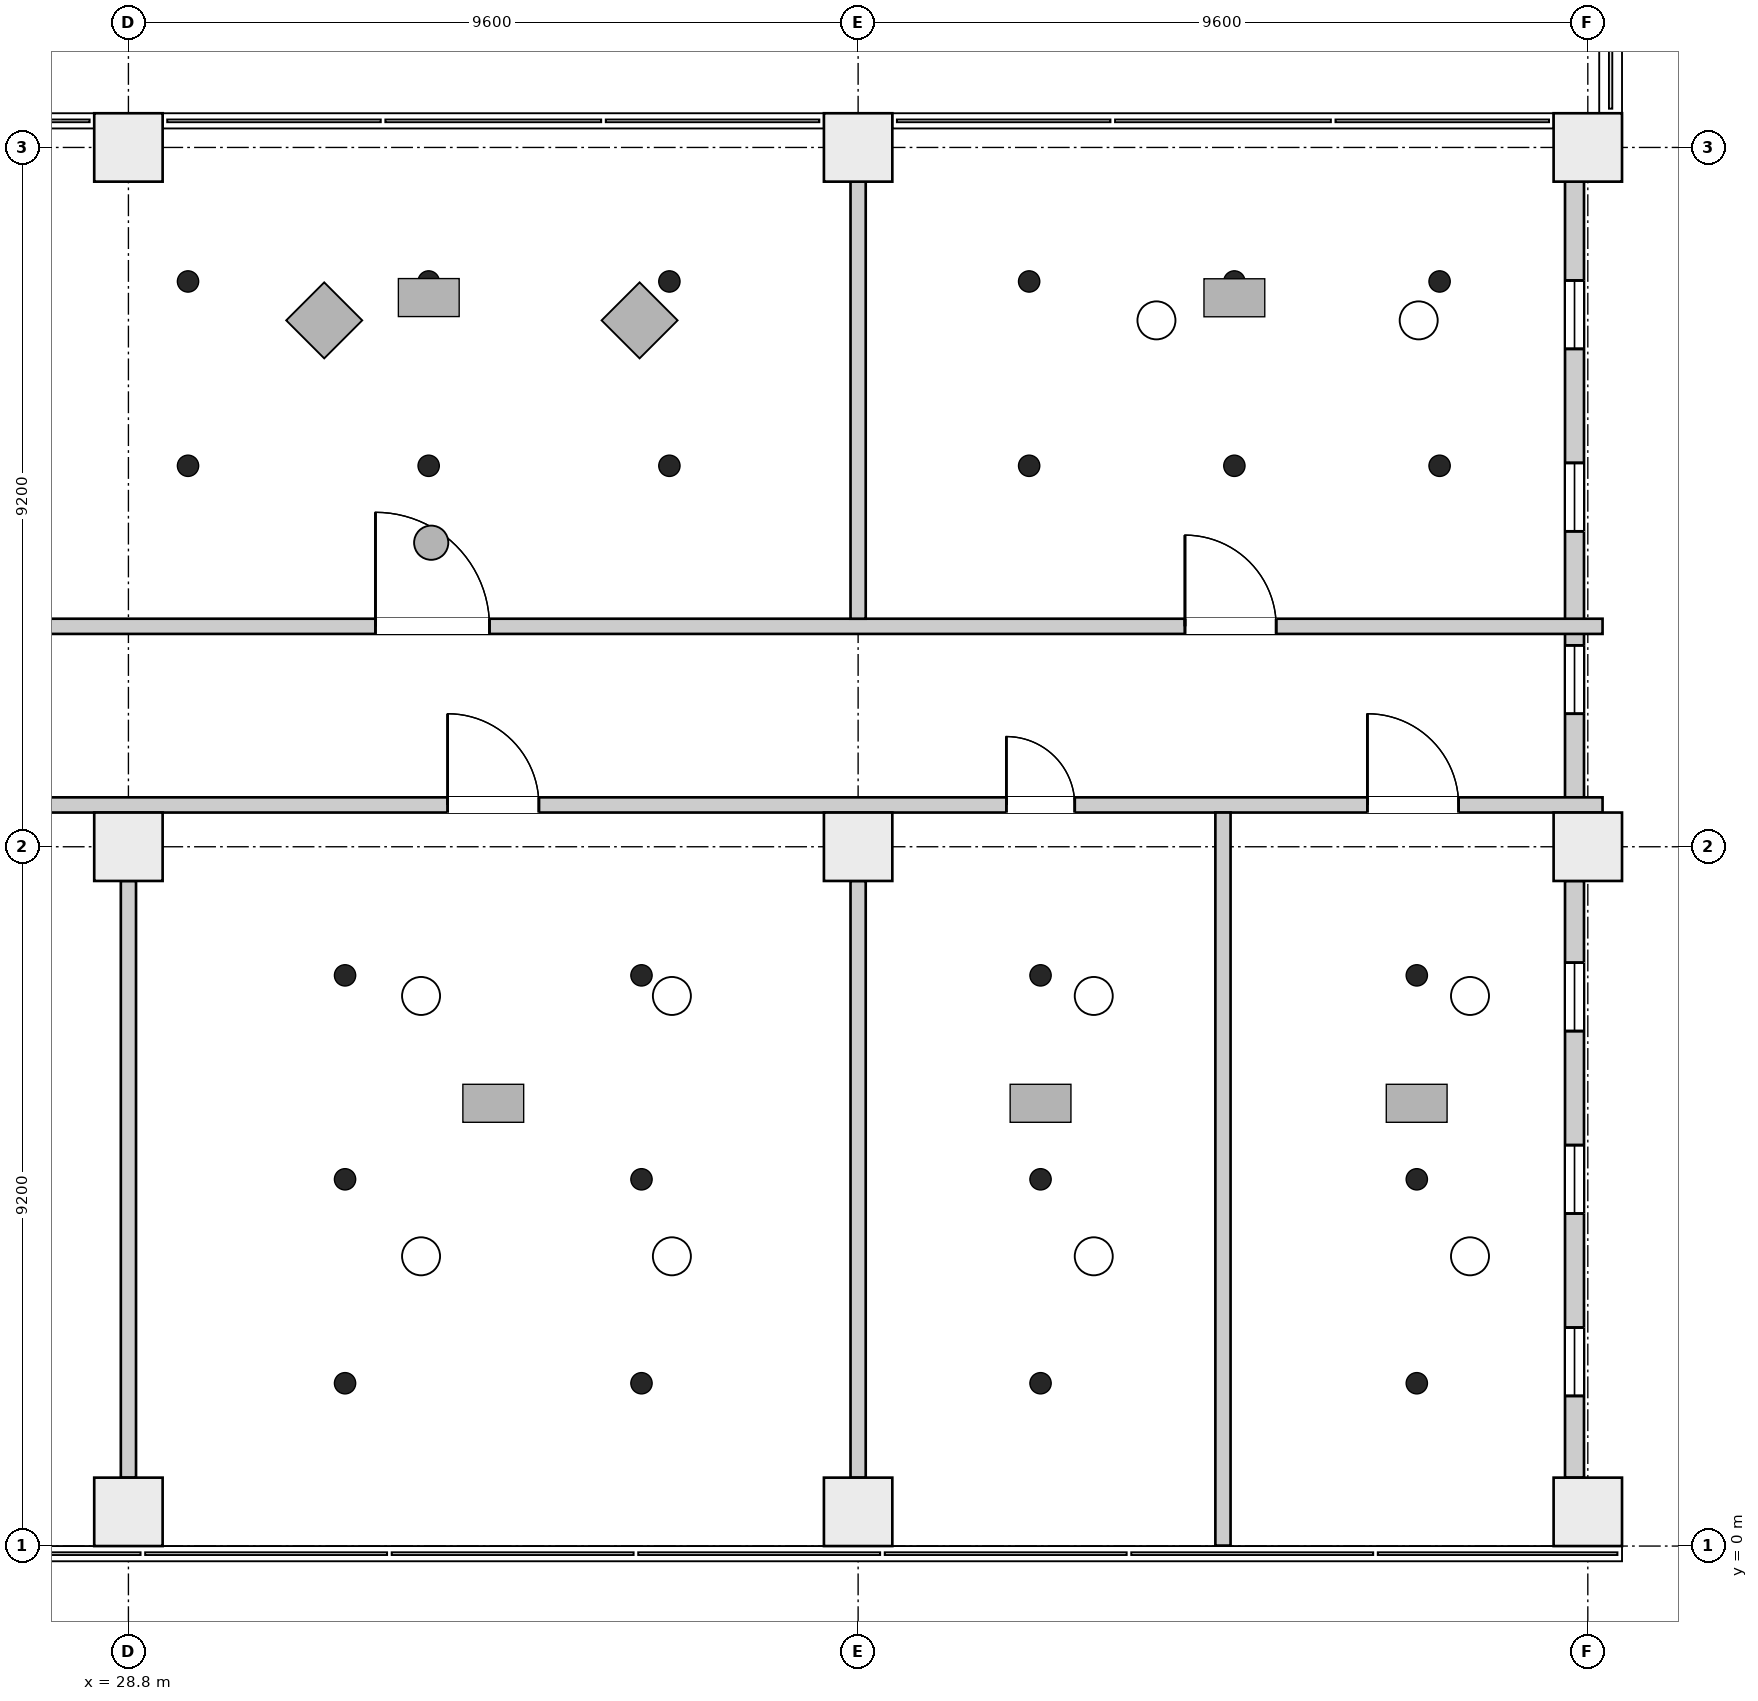
"""IFC4 building model, lengths in metres.
Left out: names, types, materials, properties, quantities, classifications, styles, units other than length and angle.
Written with IfcOpenShell. Run it as: python <this file> out.ifc"""

import sys

from ifc_helpers import new_model, si_unit, direction, frame, frame_2d, origin, origin_2d, place, context, subcontext, project, spatial, rectangle, extrude, element, fill, save


model = new_model("IFC4")
c1 = context("Model", 3, precision=1e-05, world=origin(), true_north=direction((0.0, 1.0)))
c2 = subcontext(c1, "Body", "Model", "MODEL_VIEW")
j1 = project(units=[si_unit("LENGTHUNIT", "METRE"), si_unit("PLANEANGLEUNIT", "RADIAN")], contexts=[c1])
p1 = place(None, origin())
s1 = spatial("IfcSite", under=j1, at=p1, CompositionType="ELEMENT")
p2 = place(p1, origin())
s2 = spatial("IfcBuilding", under=s1, at=p2, CompositionType="ELEMENT")
p3 = place(p2, frame((0.0, 0.0, 61.3)))
s3 = spatial("IfcBuildingStorey", under=s2, at=p3, CompositionType="ELEMENT", Elevation=61.3)
for number, where, z_axis, x_axis in (
    (1, (28.8, 0.45, 0.0), (0.0, 0.0, 1.0), (1.0, 0.0, 0.0)),
    (2, (38.4, 0.45, 0.0), (0.0, 0.0, 1.0), (1.0, 0.0, 0.0)),
    (3, (48.0, 0.45, 0.0), (0.0, 0.0, 1.0), (1.0, 0.0, 0.0)),
    (4, (28.8, 9.2, 0.0), (0.0, 0.0, 1.0), (1.0, 0.0, 0.0)),
    (5, (38.4, 9.2, 0.0), (0.0, 0.0, 1.0), (1.0, 0.0, 0.0)),
    (6, (48.0, 9.2, 0.0), (0.0, 0.0, 1.0), (1.0, 0.0, 0.0)),
    (7, (28.8, 18.4, 0.0), (0.0, 0.0, 1.0), (1.0, 0.0, 0.0)),
    (8, (38.4, 18.4, 0.0), (0.0, 0.0, 1.0), (1.0, 0.0, 0.0)),
    (9, (48.0, 18.4, 0.0), (0.0, 0.0, 1.0), (1.0, 0.0, 0.0)),
):
    element("IfcColumn", number, at=place(p3, frame(where, z_axis=z_axis, x_axis=x_axis)), inside=s3, PredefinedType="COLUMN", context=c2, shape_type="SweptSolid", body=[
        extrude(rectangle(XDim=0.9, YDim=0.9, at=origin_2d()), origin(), (0.0, 0.0, 1.0), 4.2),
    ])
p4 = place(p3, frame((47.825, 0.9, 0.0), z_axis=(0.0, 0.0, 1.0), x_axis=(0.0, 1.0, 0.0)))
e10 = element("IfcWall", 10, at=p4, inside=s3, PredefinedType="ELEMENTEDWALL", context=c2, shape_type="SweptSolid", body=[
    extrude(rectangle(XDim=7.85, YDim=0.25, at=frame_2d((3.925, 0.0))), origin(), (0.0, 0.0, 1.0), 3.3),
])
p5 = place(p4, frame((1.075, 0.0, 0.6)))
e11 = element("IfcOpeningElement", 11, at=p5, cuts=e10, PredefinedType="OPENING", context=c2, shape_type="SweptSolid", body=[
    extrude(rectangle(XDim=0.9, YDim=2.6, at=frame_2d((0.45, 1.3))), frame((0.0, 0.135, 0.0), z_axis=(0.0, -1.0, 0.0), x_axis=(1.0, 0.0, 0.0)), (0.0, 0.0, 1.0), 0.27),
])
p6 = place(p4, frame((3.475, 0.0, 0.6)))
e12 = element("IfcOpeningElement", 12, at=p6, cuts=e10, PredefinedType="OPENING", context=c2, shape_type="SweptSolid", body=[
    extrude(rectangle(XDim=0.9, YDim=2.6, at=frame_2d((0.45, 1.3))), frame((0.0, 0.135, 0.0), z_axis=(0.0, -1.0, 0.0), x_axis=(1.0, 0.0, 0.0)), (0.0, 0.0, 1.0), 0.27),
])
p7 = place(p4, frame((5.875, 0.0, 0.6)))
e13 = element("IfcOpeningElement", 13, at=p7, cuts=e10, PredefinedType="OPENING", context=c2, shape_type="SweptSolid", body=[
    extrude(rectangle(XDim=0.9, YDim=2.6, at=frame_2d((0.45, 1.3))), frame((0.0, 0.135, 0.0), z_axis=(0.0, -1.0, 0.0), x_axis=(1.0, 0.0, 0.0)), (0.0, 0.0, 1.0), 0.27),
])
p8 = place(p3, frame((47.825, 9.65, 0.0), z_axis=(0.0, 0.0, 1.0), x_axis=(0.0, 1.0, 0.0)))
e14 = element("IfcWall", 14, at=p8, inside=s3, PredefinedType="ELEMENTEDWALL", context=c2, shape_type="SweptSolid", body=[
    extrude(rectangle(XDim=8.3, YDim=0.25, at=frame_2d((4.15, 0.0))), origin(), (0.0, 0.0, 1.0), 3.3),
])
p9 = place(p8, frame((1.3, 0.0, 0.6)))
e15 = element("IfcOpeningElement", 15, at=p9, cuts=e14, PredefinedType="OPENING", context=c2, shape_type="SweptSolid", body=[
    extrude(rectangle(XDim=0.9, YDim=2.6, at=frame_2d((0.45, 1.3))), frame((0.0, 0.135, 0.0), z_axis=(0.0, -1.0, 0.0), x_axis=(1.0, 0.0, 0.0)), (0.0, 0.0, 1.0), 0.27),
])
p10 = place(p8, frame((3.7, 0.0, 0.6)))
e16 = element("IfcOpeningElement", 16, at=p10, cuts=e14, PredefinedType="OPENING", context=c2, shape_type="SweptSolid", body=[
    extrude(rectangle(XDim=0.9, YDim=2.6, at=frame_2d((0.45, 1.3))), frame((0.0, 0.135, 0.0), z_axis=(0.0, -1.0, 0.0), x_axis=(1.0, 0.0, 0.0)), (0.0, 0.0, 1.0), 0.27),
])
p11 = place(p8, frame((6.1, 0.0, 0.6)))
e17 = element("IfcOpeningElement", 17, at=p11, cuts=e14, PredefinedType="OPENING", context=c2, shape_type="SweptSolid", body=[
    extrude(rectangle(XDim=0.9, YDim=2.6, at=frame_2d((0.45, 1.3))), frame((0.0, 0.135, 0.0), z_axis=(0.0, -1.0, 0.0), x_axis=(1.0, 0.0, 0.0)), (0.0, 0.0, 1.0), 0.27),
])
p12 = place(p3, frame((4.3, 9.75, 0.0), z_axis=(0.0, 0.0, 1.0), x_axis=(1.0, 0.0, 0.0)))
e18 = element("IfcWall", 18, at=p12, inside=s3, PredefinedType="PARTITIONING", context=c2, shape_type="SweptSolid", body=[
    extrude(rectangle(XDim=43.894, YDim=0.2, at=frame_2d((21.947, 0.0))), origin(), (0.0, 0.0, 1.0), 3.9),
])
p13 = place(p12, frame((18.8, 0.0, 0.0)))
e19 = element("IfcOpeningElement", 19, at=p13, cuts=e18, PredefinedType="OPENING", context=c2, shape_type="SweptSolid", body=[
    extrude(rectangle(XDim=1.8, YDim=2.1, at=frame_2d((0.9, 1.05))), frame((0.0, 0.11, 0.0), z_axis=(0.0, -1.0, 0.0), x_axis=(1.0, 0.0, 0.0)), (0.0, 0.0, 1.0), 0.22),
])
p14 = place(p12, frame((28.7, 0.0, 0.0)))
e20 = element("IfcOpeningElement", 20, at=p14, cuts=e18, PredefinedType="OPENING", context=c2, shape_type="SweptSolid", body=[
    extrude(rectangle(XDim=1.2, YDim=2.1, at=frame_2d((0.6, 1.05))), frame((0.0, 0.11, 0.0), z_axis=(0.0, -1.0, 0.0), x_axis=(1.0, 0.0, 0.0)), (0.0, 0.0, 1.0), 0.22),
])
p15 = place(p12, frame((36.05, 0.0, 0.0)))
e21 = element("IfcOpeningElement", 21, at=p15, cuts=e18, PredefinedType="OPENING", context=c2, shape_type="SweptSolid", body=[
    extrude(rectangle(XDim=0.9, YDim=2.1, at=frame_2d((0.45, 1.05))), frame((0.0, 0.11, 0.0), z_axis=(0.0, -1.0, 0.0), x_axis=(1.0, 0.0, 0.0)), (0.0, 0.0, 1.0), 0.22),
])
p16 = place(p12, frame((40.8, 0.0, 0.0)))
e22 = element("IfcOpeningElement", 22, at=p16, cuts=e18, PredefinedType="OPENING", context=c2, shape_type="SweptSolid", body=[
    extrude(rectangle(XDim=1.2, YDim=2.1, at=frame_2d((0.6, 1.05))), frame((0.0, 0.11, 0.0), z_axis=(0.0, -1.0, 0.0), x_axis=(1.0, 0.0, 0.0)), (0.0, 0.0, 1.0), 0.22),
])
p17 = place(p3, frame((27.206, 12.1, 0.0), z_axis=(0.0, 0.0, 1.0), x_axis=(1.0, 0.0, 0.0)))
e23 = element("IfcWall", 23, at=p17, inside=s3, PredefinedType="PARTITIONING", context=c2, shape_type="SweptSolid", body=[
    extrude(rectangle(XDim=20.988, YDim=0.2, at=frame_2d((10.494, 0.0))), origin(), (0.0, 0.0, 1.0), 3.9),
])
p18 = place(p17, frame((4.844, 0.0, 0.0)))
e24 = element("IfcOpeningElement", 24, at=p18, cuts=e23, PredefinedType="OPENING", context=c2, shape_type="SweptSolid", body=[
    extrude(rectangle(XDim=1.5, YDim=2.1, at=frame_2d((0.75, 1.05))), frame((0.0, 0.11, 0.0), z_axis=(0.0, -1.0, 0.0), x_axis=(1.0, 0.0, 0.0)), (0.0, 0.0, 1.0), 0.22),
])
p19 = place(p17, frame((15.494, 0.0, 0.0)))
e25 = element("IfcOpeningElement", 25, at=p19, cuts=e23, PredefinedType="OPENING", context=c2, shape_type="SweptSolid", body=[
    extrude(rectangle(XDim=1.2, YDim=2.1, at=frame_2d((0.6, 1.05))), frame((0.0, 0.11, 0.0), z_axis=(0.0, -1.0, 0.0), x_axis=(1.0, 0.0, 0.0)), (0.0, 0.0, 1.0), 0.22),
])
for number, where, z_axis, x_axis in (
    (26, (28.8, 0.9, 0.0), (0.0, 0.0, 1.0), (0.0, 1.0, 0.0)),
    (27, (38.4, 0.9, 0.0), (0.0, 0.0, 1.0), (0.0, 1.0, 0.0)),
):
    element("IfcWall", number, at=place(p3, frame(where, z_axis=z_axis, x_axis=x_axis)), inside=s3, PredefinedType="PARTITIONING", context=c2, shape_type="SweptSolid", body=[
        extrude(rectangle(XDim=7.85, YDim=0.2, at=frame_2d((3.925, 0.0))), origin(), (0.0, 0.0, 1.0), 3.9),
    ])
p20 = place(p3, frame((38.4, 12.2, 0.0), z_axis=(0.0, 0.0, 1.0), x_axis=(0.0, 1.0, 0.0)))
e28 = element("IfcWall", 28, at=p20, inside=s3, PredefinedType="PARTITIONING", context=c2, shape_type="SweptSolid", body=[
    extrude(rectangle(XDim=5.75, YDim=0.2, at=frame_2d((2.875, 0.0))), origin(), (0.0, 0.0, 1.0), 3.9),
])
p21 = place(p3, frame((43.2, 0.006, 0.0), z_axis=(0.0, 0.0, 1.0), x_axis=(0.0, 1.0, 0.0)))
e29 = element("IfcWall", 29, at=p21, inside=s3, PredefinedType="PARTITIONING", context=c2, shape_type="SweptSolid", body=[
    extrude(rectangle(XDim=9.644, YDim=0.2, at=frame_2d((4.822, 0.0))), origin(), (0.0, 0.0, 1.0), 3.9),
])
p22 = place(p5, origin())
e30 = element("IfcWindow", 30, at=p22, inside=s3, PartitioningType="SINGLE_PANEL", PredefinedType="WINDOW", context=c2, shape_type="SweptSolid", body=[
    extrude(rectangle(XDim=0.9, YDim=2.6, at=frame_2d((0.45, 1.3))), frame((0.0, 0.03, 0.0), z_axis=(0.0, -1.0, 0.0), x_axis=(1.0, 0.0, 0.0)), (0.0, 0.0, 1.0), 0.06),
])
fill(e11, e30)
p23 = place(p6, origin())
e31 = element("IfcWindow", 31, at=p23, inside=s3, PartitioningType="SINGLE_PANEL", PredefinedType="WINDOW", context=c2, shape_type="SweptSolid", body=[
    extrude(rectangle(XDim=0.9, YDim=2.6, at=frame_2d((0.45, 1.3))), frame((0.0, 0.03, 0.0), z_axis=(0.0, -1.0, 0.0), x_axis=(1.0, 0.0, 0.0)), (0.0, 0.0, 1.0), 0.06),
])
fill(e12, e31)
p24 = place(p7, origin())
e32 = element("IfcWindow", 32, at=p24, inside=s3, PartitioningType="SINGLE_PANEL", PredefinedType="WINDOW", context=c2, shape_type="SweptSolid", body=[
    extrude(rectangle(XDim=0.9, YDim=2.6, at=frame_2d((0.45, 1.3))), frame((0.0, 0.03, 0.0), z_axis=(0.0, -1.0, 0.0), x_axis=(1.0, 0.0, 0.0)), (0.0, 0.0, 1.0), 0.06),
])
fill(e13, e32)
p25 = place(p9, origin())
e33 = element("IfcWindow", 33, at=p25, inside=s3, PartitioningType="SINGLE_PANEL", PredefinedType="WINDOW", context=c2, shape_type="SweptSolid", body=[
    extrude(rectangle(XDim=0.9, YDim=2.6, at=frame_2d((0.45, 1.3))), frame((0.0, 0.03, 0.0), z_axis=(0.0, -1.0, 0.0), x_axis=(1.0, 0.0, 0.0)), (0.0, 0.0, 1.0), 0.06),
])
fill(e15, e33)
p26 = place(p10, origin())
e34 = element("IfcWindow", 34, at=p26, inside=s3, PartitioningType="SINGLE_PANEL", PredefinedType="WINDOW", context=c2, shape_type="SweptSolid", body=[
    extrude(rectangle(XDim=0.9, YDim=2.6, at=frame_2d((0.45, 1.3))), frame((0.0, 0.03, 0.0), z_axis=(0.0, -1.0, 0.0), x_axis=(1.0, 0.0, 0.0)), (0.0, 0.0, 1.0), 0.06),
])
fill(e16, e34)
p27 = place(p11, origin())
e35 = element("IfcWindow", 35, at=p27, inside=s3, PartitioningType="SINGLE_PANEL", PredefinedType="WINDOW", context=c2, shape_type="SweptSolid", body=[
    extrude(rectangle(XDim=0.9, YDim=2.6, at=frame_2d((0.45, 1.3))), frame((0.0, 0.03, 0.0), z_axis=(0.0, -1.0, 0.0), x_axis=(1.0, 0.0, 0.0)), (0.0, 0.0, 1.0), 0.06),
])
fill(e17, e35)
p28 = place(p14, origin())
e36 = element("IfcDoor", 36, at=p28, inside=s3, OperationType="SINGLE_SWING_RIGHT", PredefinedType="DOOR", context=c2, shape_type="SweptSolid", body=[
    extrude(rectangle(XDim=1.2, YDim=2.1, at=frame_2d((0.6, 1.05))), frame((0.0, 0.025, 0.0), z_axis=(0.0, -1.0, 0.0), x_axis=(1.0, 0.0, 0.0)), (0.0, 0.0, 1.0), 0.05),
])
fill(e20, e36)
p29 = place(p15, origin())
e37 = element("IfcDoor", 37, at=p29, inside=s3, OperationType="SINGLE_SWING_LEFT", PredefinedType="DOOR", context=c2, shape_type="SweptSolid", body=[
    extrude(rectangle(XDim=0.9, YDim=2.1, at=frame_2d((0.45, 1.05))), frame((0.0, 0.025, 0.0), z_axis=(0.0, -1.0, 0.0), x_axis=(1.0, 0.0, 0.0)), (0.0, 0.0, 1.0), 0.05),
])
fill(e21, e37)
p30 = place(p16, origin())
e38 = element("IfcDoor", 38, at=p30, inside=s3, OperationType="SINGLE_SWING_LEFT", PredefinedType="DOOR", context=c2, shape_type="SweptSolid", body=[
    extrude(rectangle(XDim=1.2, YDim=2.1, at=frame_2d((0.6, 1.05))), frame((0.0, 0.025, 0.0), z_axis=(0.0, -1.0, 0.0), x_axis=(1.0, 0.0, 0.0)), (0.0, 0.0, 1.0), 0.05),
])
fill(e22, e38)
p31 = place(p18, origin())
e39 = element("IfcDoor", 39, at=p31, inside=s3, OperationType="DOUBLE_DOOR_SINGLE_SWING", PredefinedType="DOOR", context=c2, shape_type="SweptSolid", body=[
    extrude(rectangle(XDim=1.5, YDim=2.1, at=frame_2d((0.75, 1.05))), frame((0.0, 0.025, 0.0), z_axis=(0.0, -1.0, 0.0), x_axis=(1.0, 0.0, 0.0)), (0.0, 0.0, 1.0), 0.05),
])
fill(e24, e39)
p32 = place(p19, origin())
e40 = element("IfcDoor", 40, at=p32, inside=s3, OperationType="SINGLE_SWING_RIGHT", PredefinedType="DOOR", context=c2, shape_type="SweptSolid", body=[
    extrude(rectangle(XDim=1.2, YDim=2.1, at=frame_2d((0.6, 1.05))), frame((0.0, 0.025, 0.0), z_axis=(0.0, -1.0, 0.0), x_axis=(1.0, 0.0, 0.0)), (0.0, 0.0, 1.0), 0.05),
])
fill(e25, e40)
save(model, sys.argv[1])
